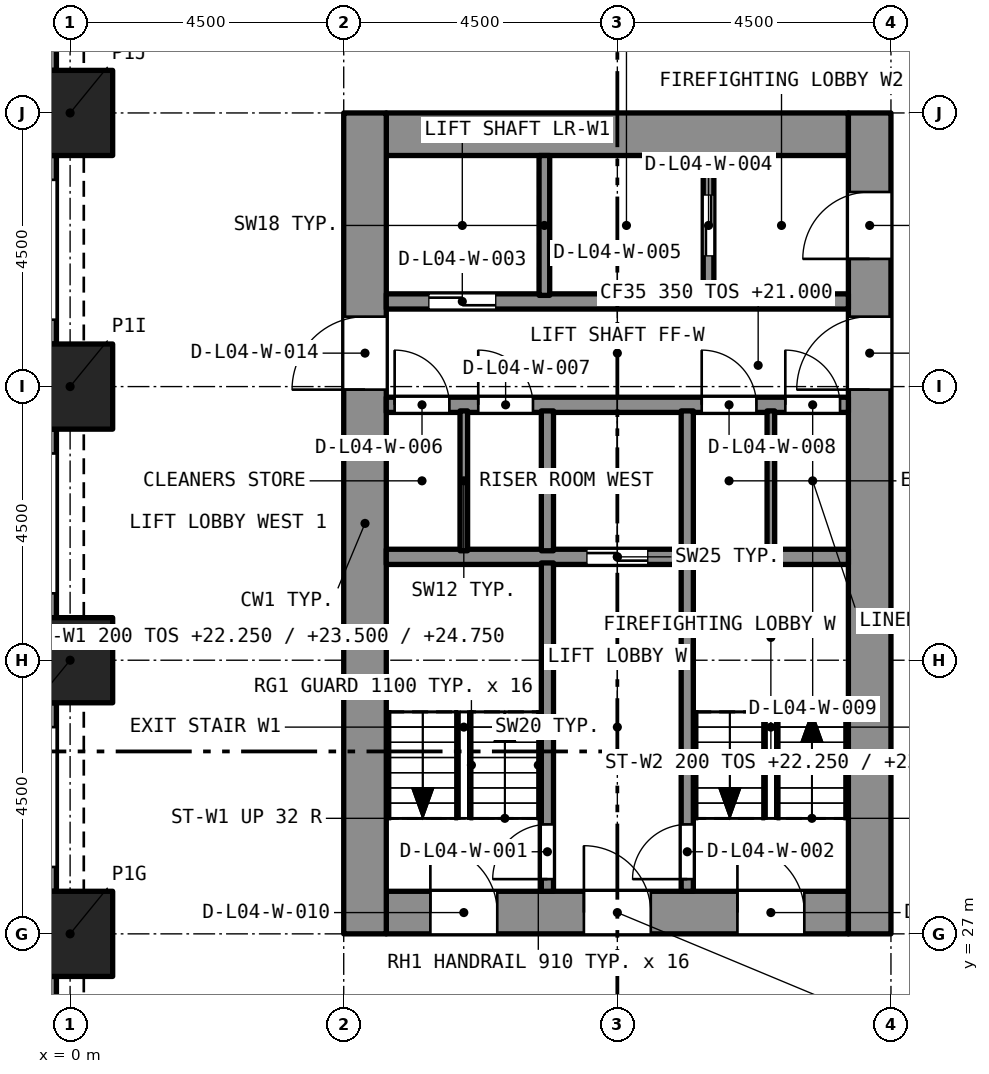
"""IFC4 building model, lengths in metres.
Left out: names, types, materials, properties, quantities, classifications, styles, units other than length and angle.
Written with IfcOpenShell. Run it as: python <this file> out.ifc"""

import sys

from ifc_helpers import new_model, si_unit, direction, frame, frame_2d, origin, origin_2d, place, context, subcontext, project, spatial, rectangle, extrude, element, fill, save


model = new_model("IFC4")
c1 = context("Model", 3, precision=1e-05, world=origin(), true_north=direction((0.0, 1.0)))
c2 = subcontext(c1, "Body", "Model", "MODEL_VIEW")
j1 = project(units=[si_unit("LENGTHUNIT", "METRE"), si_unit("PLANEANGLEUNIT", "RADIAN")], contexts=[c1])
p1 = place(None, origin())
s1 = spatial("IfcSite", under=j1, at=p1, CompositionType="ELEMENT")
p2 = place(p1, origin())
s2 = spatial("IfcBuilding", under=s1, at=p2, CompositionType="ELEMENT")
p3 = place(p2, frame((0.0, 0.0, 21.0)))
s3 = spatial("IfcBuildingStorey", under=s2, at=p3, CompositionType="ELEMENT", Elevation=21.0)
for number, where, z_axis, x_axis in (
    (1, (0.0, 27.0, 0.0), (0.0, 0.0, 1.0), (1.0, 0.0, 0.0)),
    (2, (0.0, 31.5, 0.0), (0.0, 0.0, 1.0), (1.0, 0.0, 0.0)),
    (3, (0.0, 36.0, 0.0), (0.0, 0.0, 1.0), (1.0, 0.0, 0.0)),
    (4, (0.0, 40.5, 0.0), (0.0, 0.0, 1.0), (1.0, 0.0, 0.0)),
):
    element("IfcColumn", number, at=place(p3, frame(where, z_axis=z_axis, x_axis=x_axis)), inside=s3, PredefinedType="COLUMN", context=c2, shape_type="SweptSolid", body=[
        extrude(rectangle(XDim=1.4, YDim=1.4, at=origin_2d()), origin(), (0.0, 0.0, 1.0), 5.0),
    ])
p4 = place(p3, frame((5.2, 27.35, 0.0), z_axis=(0.0, 0.0, 1.0), x_axis=(1.0, 0.0, 0.0)))
e5 = element("IfcWall", 5, at=p4, inside=s3, PredefinedType="SOLIDWALL", context=c2, shape_type="SweptSolid", body=[
    extrude(rectangle(XDim=7.6, YDim=0.7, at=frame_2d((3.8, 0.0))), origin(), (0.0, 0.0, 1.0), 5.0),
])
p5 = place(p4, frame((0.725, 0.0, 0.0)))
e6 = element("IfcOpeningElement", 6, at=p5, cuts=e5, PredefinedType="OPENING", context=c2, shape_type="SweptSolid", body=[
    extrude(rectangle(XDim=1.1, YDim=2.1, at=frame_2d((0.55, 1.05))), frame((0.0, 0.36, 0.0), z_axis=(0.0, -1.0, 0.0), x_axis=(1.0, 0.0, 0.0)), (0.0, 0.0, 1.0), 0.72),
])
p6 = place(p4, frame((3.25, 0.0, 0.0)))
e7 = element("IfcOpeningElement", 7, at=p6, cuts=e5, PredefinedType="OPENING", context=c2, shape_type="SweptSolid", body=[
    extrude(rectangle(XDim=1.1, YDim=2.1, at=frame_2d((0.55, 1.05))), frame((0.0, 0.36, 0.0), z_axis=(0.0, -1.0, 0.0), x_axis=(1.0, 0.0, 0.0)), (0.0, 0.0, 1.0), 0.72),
])
p7 = place(p4, frame((5.775, 0.0, 0.0)))
e8 = element("IfcOpeningElement", 8, at=p7, cuts=e5, PredefinedType="OPENING", context=c2, shape_type="SweptSolid", body=[
    extrude(rectangle(XDim=1.1, YDim=2.1, at=frame_2d((0.55, 1.05))), frame((0.0, 0.36, 0.0), z_axis=(0.0, -1.0, 0.0), x_axis=(1.0, 0.0, 0.0)), (0.0, 0.0, 1.0), 0.72),
])
p8 = place(p3, frame((5.2, 40.15, 0.0), z_axis=(0.0, 0.0, 1.0), x_axis=(1.0, 0.0, 0.0)))
e9 = element("IfcWall", 9, at=p8, inside=s3, PredefinedType="SOLIDWALL", context=c2, shape_type="SweptSolid", body=[
    extrude(rectangle(XDim=7.6, YDim=0.7, at=frame_2d((3.8, 0.0))), origin(), (0.0, 0.0, 1.0), 5.0),
])
p9 = place(p3, frame((4.85, 27.0, 0.0), z_axis=(0.0, 0.0, 1.0), x_axis=(0.0, 1.0, 0.0)))
e10 = element("IfcWall", 10, at=p9, inside=s3, PredefinedType="SOLIDWALL", context=c2, shape_type="SweptSolid", body=[
    extrude(rectangle(XDim=13.5, YDim=0.7, at=frame_2d((6.75, 0.0))), origin(), (0.0, 0.0, 1.0), 5.0),
])
p10 = place(p9, frame((8.95, 0.0, 0.0)))
e11 = element("IfcOpeningElement", 11, at=p10, cuts=e10, PredefinedType="OPENING", context=c2, shape_type="SweptSolid", body=[
    extrude(rectangle(XDim=1.2, YDim=2.1, at=frame_2d((0.6, 1.05))), frame((0.0, 0.36, 0.0), z_axis=(0.0, -1.0, 0.0), x_axis=(1.0, 0.0, 0.0)), (0.0, 0.0, 1.0), 0.72),
])
p11 = place(p3, frame((13.15, 27.0, 0.0), z_axis=(0.0, 0.0, 1.0), x_axis=(0.0, 1.0, 0.0)))
e12 = element("IfcWall", 12, at=p11, inside=s3, PredefinedType="SOLIDWALL", context=c2, shape_type="SweptSolid", body=[
    extrude(rectangle(XDim=13.5, YDim=0.7, at=frame_2d((6.75, 0.0))), origin(), (0.0, 0.0, 1.0), 5.0),
])
p12 = place(p11, frame((11.1, 0.0, 0.0)))
e13 = element("IfcOpeningElement", 13, at=p12, cuts=e12, PredefinedType="OPENING", context=c2, shape_type="SweptSolid", body=[
    extrude(rectangle(XDim=1.1, YDim=2.1, at=frame_2d((0.55, 1.05))), frame((0.0, 0.36, 0.0), z_axis=(0.0, -1.0, 0.0), x_axis=(1.0, 0.0, 0.0)), (0.0, 0.0, 1.0), 0.72),
])
p13 = place(p11, frame((8.95, 0.0, 0.0)))
e14 = element("IfcOpeningElement", 14, at=p13, cuts=e12, PredefinedType="OPENING", context=c2, shape_type="SweptSolid", body=[
    extrude(rectangle(XDim=1.2, YDim=2.1, at=frame_2d((0.6, 1.05))), frame((0.0, 0.36, 0.0), z_axis=(0.0, -1.0, 0.0), x_axis=(1.0, 0.0, 0.0)), (0.0, 0.0, 1.0), 0.72),
])
p14 = place(p3, frame((-0.375, 41.2, 0.0), z_axis=(0.0, 0.0, 1.0), x_axis=(0.0, 1.0, 0.0)))
e15 = element("IfcWall", 15, at=p14, inside=s3, PredefinedType="SOLIDWALL", context=c2, shape_type="SweptSolid", body=[
    extrude(rectangle(XDim=3.1, YDim=0.3, at=frame_2d((1.55, 0.0))), origin(), (0.0, 0.0, 1.0), 5.0),
])
p15 = place(p14, frame((0.4, 0.0, 0.45)))
e16 = element("IfcOpeningElement", 16, at=p15, cuts=e15, PredefinedType="OPENING", context=c2, shape_type="SweptSolid", body=[
    extrude(rectangle(XDim=2.3, YDim=3.3, at=frame_2d((1.15, 1.65))), frame((0.0, 0.16, 0.0), z_axis=(0.0, -1.0, 0.0), x_axis=(1.0, 0.0, 0.0)), (0.0, 0.0, 1.0), 0.32),
])
p16 = place(p3, frame((-0.375, 36.7, 0.0), z_axis=(0.0, 0.0, 1.0), x_axis=(0.0, 1.0, 0.0)))
e17 = element("IfcWall", 17, at=p16, inside=s3, PredefinedType="SOLIDWALL", context=c2, shape_type="SweptSolid", body=[
    extrude(rectangle(XDim=3.1, YDim=0.3, at=frame_2d((1.55, 0.0))), origin(), (0.0, 0.0, 1.0), 5.0),
])
p17 = place(p16, frame((0.4, 0.0, 0.45)))
e18 = element("IfcOpeningElement", 18, at=p17, cuts=e17, PredefinedType="OPENING", context=c2, shape_type="SweptSolid", body=[
    extrude(rectangle(XDim=2.3, YDim=3.3, at=frame_2d((1.15, 1.65))), frame((0.0, 0.16, 0.0), z_axis=(0.0, -1.0, 0.0), x_axis=(1.0, 0.0, 0.0)), (0.0, 0.0, 1.0), 0.32),
])
p18 = place(p3, frame((-0.375, 32.2, 0.0), z_axis=(0.0, 0.0, 1.0), x_axis=(0.0, 1.0, 0.0)))
e19 = element("IfcWall", 19, at=p18, inside=s3, PredefinedType="SOLIDWALL", context=c2, shape_type="SweptSolid", body=[
    extrude(rectangle(XDim=3.1, YDim=0.3, at=frame_2d((1.55, 0.0))), origin(), (0.0, 0.0, 1.0), 5.0),
])
p19 = place(p18, frame((0.4, 0.0, 0.45)))
e20 = element("IfcOpeningElement", 20, at=p19, cuts=e19, PredefinedType="OPENING", context=c2, shape_type="SweptSolid", body=[
    extrude(rectangle(XDim=2.3, YDim=3.3, at=frame_2d((1.15, 1.65))), frame((0.0, 0.16, 0.0), z_axis=(0.0, -1.0, 0.0), x_axis=(1.0, 0.0, 0.0)), (0.0, 0.0, 1.0), 0.32),
])
p20 = place(p3, frame((-0.375, 27.7, 0.0), z_axis=(0.0, 0.0, 1.0), x_axis=(0.0, 1.0, 0.0)))
e21 = element("IfcWall", 21, at=p20, inside=s3, PredefinedType="SOLIDWALL", context=c2, shape_type="SweptSolid", body=[
    extrude(rectangle(XDim=3.1, YDim=0.3, at=frame_2d((1.55, 0.0))), origin(), (0.0, 0.0, 1.0), 5.0),
])
p21 = place(p20, frame((0.4, 0.0, 0.45)))
e22 = element("IfcOpeningElement", 22, at=p21, cuts=e21, PredefinedType="OPENING", context=c2, shape_type="SweptSolid", body=[
    extrude(rectangle(XDim=2.3, YDim=3.3, at=frame_2d((1.15, 1.65))), frame((0.0, 0.16, 0.0), z_axis=(0.0, -1.0, 0.0), x_axis=(1.0, 0.0, 0.0)), (0.0, 0.0, 1.0), 0.32),
])
p22 = place(p3, frame((-0.375, 23.2, 0.0), z_axis=(0.0, 0.0, 1.0), x_axis=(0.0, 1.0, 0.0)))
e23 = element("IfcWall", 23, at=p22, inside=s3, PredefinedType="SOLIDWALL", context=c2, shape_type="SweptSolid", body=[
    extrude(rectangle(XDim=3.1, YDim=0.3, at=frame_2d((1.55, 0.0))), origin(), (0.0, 0.0, 1.0), 5.0),
])
p23 = place(p22, frame((0.4, 0.0, 0.45)))
e24 = element("IfcOpeningElement", 24, at=p23, cuts=e23, PredefinedType="OPENING", context=c2, shape_type="SweptSolid", body=[
    extrude(rectangle(XDim=2.3, YDim=3.3, at=frame_2d((1.15, 1.65))), frame((0.0, 0.16, 0.0), z_axis=(0.0, -1.0, 0.0), x_axis=(1.0, 0.0, 0.0)), (0.0, 0.0, 1.0), 0.32),
])
p24 = place(p3, frame((5.2, 33.2, 0.0), z_axis=(0.0, 0.0, 1.0), x_axis=(1.0, 0.0, 0.0)))
e25 = element("IfcWall", 25, at=p24, inside=s3, PredefinedType="SOLIDWALL", context=c2, shape_type="SweptSolid", body=[
    extrude(rectangle(XDim=7.6, YDim=0.25, at=frame_2d((3.8, 0.0))), origin(), (0.0, 0.0, 1.0), 4.65),
])
p25 = place(p24, frame((3.3, 0.0, 0.0)))
e26 = element("IfcOpeningElement", 26, at=p25, cuts=e25, PredefinedType="OPENING", context=c2, shape_type="SweptSolid", body=[
    extrude(rectangle(XDim=1.0, YDim=2.1, at=frame_2d((0.5, 1.05))), frame((0.0, 0.135, 0.0), z_axis=(0.0, -1.0, 0.0), x_axis=(1.0, 0.0, 0.0)), (0.0, 0.0, 1.0), 0.27),
])
p26 = place(p3, frame((5.2, 35.7, 0.0), z_axis=(0.0, 0.0, 1.0), x_axis=(1.0, 0.0, 0.0)))
e27 = element("IfcWall", 27, at=p26, inside=s3, PredefinedType="SOLIDWALL", context=c2, shape_type="SweptSolid", body=[
    extrude(rectangle(XDim=7.6, YDim=0.25, at=frame_2d((3.8, 0.0))), origin(), (0.0, 0.0, 1.0), 4.65),
])
p27 = place(p26, frame((0.137, 0.0, 0.0)))
e28 = element("IfcOpeningElement", 28, at=p27, cuts=e27, PredefinedType="OPENING", context=c2, shape_type="SweptSolid", body=[
    extrude(rectangle(XDim=0.9, YDim=2.1, at=frame_2d((0.45, 1.05))), frame((0.0, 0.135, 0.0), z_axis=(0.0, -1.0, 0.0), x_axis=(1.0, 0.0, 0.0)), (0.0, 0.0, 1.0), 0.27),
])
p28 = place(p26, frame((1.512, 0.0, 0.0)))
e29 = element("IfcOpeningElement", 29, at=p28, cuts=e27, PredefinedType="OPENING", context=c2, shape_type="SweptSolid", body=[
    extrude(rectangle(XDim=0.9, YDim=2.1, at=frame_2d((0.45, 1.05))), frame((0.0, 0.135, 0.0), z_axis=(0.0, -1.0, 0.0), x_axis=(1.0, 0.0, 0.0)), (0.0, 0.0, 1.0), 0.27),
])
p29 = place(p26, frame((5.188, 0.0, 0.0)))
e30 = element("IfcOpeningElement", 30, at=p29, cuts=e27, PredefinedType="OPENING", context=c2, shape_type="SweptSolid", body=[
    extrude(rectangle(XDim=0.9, YDim=2.1, at=frame_2d((0.45, 1.05))), frame((0.0, 0.135, 0.0), z_axis=(0.0, -1.0, 0.0), x_axis=(1.0, 0.0, 0.0)), (0.0, 0.0, 1.0), 0.27),
])
p30 = place(p26, frame((6.562, 0.0, 0.0)))
e31 = element("IfcOpeningElement", 31, at=p30, cuts=e27, PredefinedType="OPENING", context=c2, shape_type="SweptSolid", body=[
    extrude(rectangle(XDim=0.9, YDim=2.1, at=frame_2d((0.45, 1.05))), frame((0.0, 0.135, 0.0), z_axis=(0.0, -1.0, 0.0), x_axis=(1.0, 0.0, 0.0)), (0.0, 0.0, 1.0), 0.27),
])
p31 = place(p3, frame((5.2, 37.4, 0.0), z_axis=(0.0, 0.0, 1.0), x_axis=(1.0, 0.0, 0.0)))
e32 = element("IfcWall", 32, at=p31, inside=s3, PredefinedType="SOLIDWALL", context=c2, shape_type="SweptSolid", body=[
    extrude(rectangle(XDim=7.6, YDim=0.25, at=frame_2d((3.8, 0.0))), origin(), (0.0, 0.0, 1.0), 4.65),
])
p32 = place(p31, frame((0.7, 0.0, 0.0)))
e33 = element("IfcOpeningElement", 33, at=p32, cuts=e32, PredefinedType="OPENING", context=c2, shape_type="SweptSolid", body=[
    extrude(rectangle(XDim=1.1, YDim=2.4, at=frame_2d((0.55, 1.2))), frame((0.0, 0.135, 0.0), z_axis=(0.0, -1.0, 0.0), x_axis=(1.0, 0.0, 0.0)), (0.0, 0.0, 1.0), 0.27),
])
p33 = place(p3, frame((7.85, 27.7, 0.0), z_axis=(0.0, 0.0, 1.0), x_axis=(0.0, 1.0, 0.0)))
e34 = element("IfcWall", 34, at=p33, inside=s3, PredefinedType="SOLIDWALL", context=c2, shape_type="SweptSolid", body=[
    extrude(rectangle(XDim=5.4, YDim=0.2, at=frame_2d((2.7, 0.0))), origin(), (0.0, 0.0, 1.0), 4.65),
])
p34 = place(p33, frame((0.2, 0.0, 0.0)))
e35 = element("IfcOpeningElement", 35, at=p34, cuts=e34, PredefinedType="OPENING", context=c2, shape_type="SweptSolid", body=[
    extrude(rectangle(XDim=0.9, YDim=2.1, at=frame_2d((0.45, 1.05))), frame((0.0, 0.11, 0.0), z_axis=(0.0, -1.0, 0.0), x_axis=(1.0, 0.0, 0.0)), (0.0, 0.0, 1.0), 0.22),
])
p35 = place(p3, frame((10.15, 27.7, 0.0), z_axis=(0.0, 0.0, 1.0), x_axis=(0.0, 1.0, 0.0)))
e36 = element("IfcWall", 36, at=p35, inside=s3, PredefinedType="SOLIDWALL", context=c2, shape_type="SweptSolid", body=[
    extrude(rectangle(XDim=5.4, YDim=0.2, at=frame_2d((2.7, 0.0))), origin(), (0.0, 0.0, 1.0), 4.65),
])
p36 = place(p35, frame((0.2, 0.0, 0.0)))
e37 = element("IfcOpeningElement", 37, at=p36, cuts=e36, PredefinedType="OPENING", context=c2, shape_type="SweptSolid", body=[
    extrude(rectangle(XDim=0.9, YDim=2.1, at=frame_2d((0.45, 1.05))), frame((0.0, 0.11, 0.0), z_axis=(0.0, -1.0, 0.0), x_axis=(1.0, 0.0, 0.0)), (0.0, 0.0, 1.0), 0.22),
])
for number, where, z_axis, x_axis in (
    (38, (7.85, 33.3, 0.0), (0.0, 0.0, 1.0), (0.0, 1.0, 0.0)),
    (39, (10.15, 33.3, 0.0), (0.0, 0.0, 1.0), (0.0, 1.0, 0.0)),
):
    element("IfcWall", number, at=place(p3, frame(where, z_axis=z_axis, x_axis=x_axis)), inside=s3, PredefinedType="SOLIDWALL", context=c2, shape_type="SweptSolid", body=[
        extrude(rectangle(XDim=2.3, YDim=0.2, at=frame_2d((1.15, 0.0))), origin(), (0.0, 0.0, 1.0), 4.65),
    ])
p37 = place(p3, frame((7.8, 37.5, 0.0), z_axis=(0.0, 0.0, 1.0), x_axis=(0.0, 1.0, 0.0)))
e40 = element("IfcWall", 40, at=p37, inside=s3, PredefinedType="SOLIDWALL", context=c2, shape_type="SweptSolid", body=[
    extrude(rectangle(XDim=2.3, YDim=0.175, at=frame_2d((1.15, 0.0))), origin(), (0.0, 0.0, 1.0), 4.65),
])
p38 = place(p3, frame((10.5, 37.5, 0.0), z_axis=(0.0, 0.0, 1.0), x_axis=(0.0, 1.0, 0.0)))
e41 = element("IfcWall", 41, at=p38, inside=s3, PredefinedType="SOLIDWALL", context=c2, shape_type="SweptSolid", body=[
    extrude(rectangle(XDim=2.3, YDim=0.175, at=frame_2d((1.15, 0.0))), origin(), (0.0, 0.0, 1.0), 4.65),
])
p39 = place(p38, frame((0.65, 0.0, 0.0)))
e42 = element("IfcOpeningElement", 42, at=p39, cuts=e41, PredefinedType="OPENING", context=c2, shape_type="SweptSolid", body=[
    extrude(rectangle(XDim=1.0, YDim=2.1, at=frame_2d((0.5, 1.05))), frame((0.0, 0.097, 0.0), z_axis=(0.0, -1.0, 0.0), x_axis=(1.0, 0.0, 0.0)), (0.0, 0.0, 1.0), 0.195),
])
for number, where, z_axis, x_axis in (
    (43, (6.475, 33.3, 0.0), (0.0, 0.0, 1.0), (0.0, 1.0, 0.0)),
    (44, (11.525, 33.3, 0.0), (0.0, 0.0, 1.0), (0.0, 1.0, 0.0)),
):
    element("IfcWall", number, at=place(p3, frame(where, z_axis=z_axis, x_axis=x_axis)), inside=s3, PredefinedType="PARTITIONING", context=c2, shape_type="SweptSolid", body=[
        extrude(rectangle(XDim=2.3, YDim=0.125, at=frame_2d((1.15, 0.0))), origin(), (0.0, 0.0, 1.0), 4.65),
    ])
p40 = place(p34, origin())
e45 = element("IfcDoor", 45, at=p40, inside=s3, OperationType="SINGLE_SWING_LEFT", PredefinedType="DOOR", context=c2, shape_type="SweptSolid", body=[
    extrude(rectangle(XDim=0.9, YDim=2.1, at=frame_2d((0.45, 1.05))), frame((0.0, 0.025, 0.0), z_axis=(0.0, -1.0, 0.0), x_axis=(1.0, 0.0, 0.0)), (0.0, 0.0, 1.0), 0.05),
])
fill(e35, e45)
p41 = place(p36, origin())
e46 = element("IfcDoor", 46, at=p41, inside=s3, OperationType="SINGLE_SWING_LEFT", PredefinedType="DOOR", context=c2, shape_type="SweptSolid", body=[
    extrude(rectangle(XDim=0.9, YDim=2.1, at=frame_2d((0.45, 1.05))), frame((0.0, 0.025, 0.0), z_axis=(0.0, -1.0, 0.0), x_axis=(1.0, 0.0, 0.0)), (0.0, 0.0, 1.0), 0.05),
])
fill(e37, e46)
p42 = place(p32, origin())
e47 = element("IfcDoor", 47, at=p42, inside=s3, OperationType="SLIDING_TO_LEFT", PredefinedType="DOOR", context=c2, shape_type="SweptSolid", body=[
    extrude(rectangle(XDim=1.1, YDim=2.4, at=frame_2d((0.55, 1.2))), frame((0.0, 0.025, 0.0), z_axis=(0.0, -1.0, 0.0), x_axis=(1.0, 0.0, 0.0)), (0.0, 0.0, 1.0), 0.05),
])
fill(e33, e47)
p43 = place(p39, origin())
e48 = element("IfcDoor", 48, at=p43, inside=s3, OperationType="SLIDING_TO_LEFT", PredefinedType="DOOR", context=c2, shape_type="SweptSolid", body=[
    extrude(rectangle(XDim=1.0, YDim=2.1, at=frame_2d((0.5, 1.05))), frame((0.0, 0.025, 0.0), z_axis=(0.0, -1.0, 0.0), x_axis=(1.0, 0.0, 0.0)), (0.0, 0.0, 1.0), 0.05),
])
fill(e42, e48)
p44 = place(p25, origin())
e49 = element("IfcDoor", 49, at=p44, inside=s3, OperationType="SLIDING_TO_LEFT", PredefinedType="DOOR", context=c2, shape_type="SweptSolid", body=[
    extrude(rectangle(XDim=1.0, YDim=2.1, at=frame_2d((0.5, 1.05))), frame((0.0, 0.025, 0.0), z_axis=(0.0, -1.0, 0.0), x_axis=(1.0, 0.0, 0.0)), (0.0, 0.0, 1.0), 0.05),
])
fill(e26, e49)
p45 = place(p27, origin())
e50 = element("IfcDoor", 50, at=p45, inside=s3, OperationType="SINGLE_SWING_LEFT", PredefinedType="DOOR", context=c2, shape_type="SweptSolid", body=[
    extrude(rectangle(XDim=0.9, YDim=2.1, at=frame_2d((0.45, 1.05))), frame((0.0, 0.025, 0.0), z_axis=(0.0, -1.0, 0.0), x_axis=(1.0, 0.0, 0.0)), (0.0, 0.0, 1.0), 0.05),
])
fill(e28, e50)
p46 = place(p28, origin())
e51 = element("IfcDoor", 51, at=p46, inside=s3, OperationType="SINGLE_SWING_LEFT", PredefinedType="DOOR", context=c2, shape_type="SweptSolid", body=[
    extrude(rectangle(XDim=0.9, YDim=2.1, at=frame_2d((0.45, 1.05))), frame((0.0, 0.025, 0.0), z_axis=(0.0, -1.0, 0.0), x_axis=(1.0, 0.0, 0.0)), (0.0, 0.0, 1.0), 0.05),
])
fill(e29, e51)
p47 = place(p29, origin())
e52 = element("IfcDoor", 52, at=p47, inside=s3, OperationType="SINGLE_SWING_LEFT", PredefinedType="DOOR", context=c2, shape_type="SweptSolid", body=[
    extrude(rectangle(XDim=0.9, YDim=2.1, at=frame_2d((0.45, 1.05))), frame((0.0, 0.025, 0.0), z_axis=(0.0, -1.0, 0.0), x_axis=(1.0, 0.0, 0.0)), (0.0, 0.0, 1.0), 0.05),
])
fill(e30, e52)
p48 = place(p30, origin())
e53 = element("IfcDoor", 53, at=p48, inside=s3, OperationType="SINGLE_SWING_LEFT", PredefinedType="DOOR", context=c2, shape_type="SweptSolid", body=[
    extrude(rectangle(XDim=0.9, YDim=2.1, at=frame_2d((0.45, 1.05))), frame((0.0, 0.025, 0.0), z_axis=(0.0, -1.0, 0.0), x_axis=(1.0, 0.0, 0.0)), (0.0, 0.0, 1.0), 0.05),
])
fill(e31, e53)
p49 = place(p5, origin())
e54 = element("IfcDoor", 54, at=p49, inside=s3, OperationType="SINGLE_SWING_LEFT", PredefinedType="DOOR", context=c2, shape_type="SweptSolid", body=[
    extrude(rectangle(XDim=1.1, YDim=2.1, at=frame_2d((0.55, 1.05))), frame((0.0, 0.025, 0.0), z_axis=(0.0, -1.0, 0.0), x_axis=(1.0, 0.0, 0.0)), (0.0, 0.0, 1.0), 0.05),
])
fill(e6, e54)
p50 = place(p6, origin())
e55 = element("IfcDoor", 55, at=p50, inside=s3, OperationType="SINGLE_SWING_LEFT", PredefinedType="DOOR", context=c2, shape_type="SweptSolid", body=[
    extrude(rectangle(XDim=1.1, YDim=2.1, at=frame_2d((0.55, 1.05))), frame((0.0, 0.025, 0.0), z_axis=(0.0, -1.0, 0.0), x_axis=(1.0, 0.0, 0.0)), (0.0, 0.0, 1.0), 0.05),
])
fill(e7, e55)
p51 = place(p7, origin())
e56 = element("IfcDoor", 56, at=p51, inside=s3, OperationType="SINGLE_SWING_LEFT", PredefinedType="DOOR", context=c2, shape_type="SweptSolid", body=[
    extrude(rectangle(XDim=1.1, YDim=2.1, at=frame_2d((0.55, 1.05))), frame((0.0, 0.025, 0.0), z_axis=(0.0, -1.0, 0.0), x_axis=(1.0, 0.0, 0.0)), (0.0, 0.0, 1.0), 0.05),
])
fill(e8, e56)
p52 = place(p12, origin())
e57 = element("IfcDoor", 57, at=p52, inside=s3, OperationType="SINGLE_SWING_LEFT", PredefinedType="DOOR", context=c2, shape_type="SweptSolid", body=[
    extrude(rectangle(XDim=1.1, YDim=2.1, at=frame_2d((0.55, 1.05))), frame((0.0, 0.025, 0.0), z_axis=(0.0, -1.0, 0.0), x_axis=(1.0, 0.0, 0.0)), (0.0, 0.0, 1.0), 0.05),
])
fill(e13, e57)
p53 = place(p10, origin())
e58 = element("IfcDoor", 58, at=p53, inside=s3, OperationType="SINGLE_SWING_LEFT", PredefinedType="DOOR", context=c2, shape_type="SweptSolid", body=[
    extrude(rectangle(XDim=1.2, YDim=2.1, at=frame_2d((0.6, 1.05))), frame((0.0, 0.025, 0.0), z_axis=(0.0, -1.0, 0.0), x_axis=(1.0, 0.0, 0.0)), (0.0, 0.0, 1.0), 0.05),
])
fill(e11, e58)
p54 = place(p13, origin())
e59 = element("IfcDoor", 59, at=p54, inside=s3, OperationType="SINGLE_SWING_LEFT", PredefinedType="DOOR", context=c2, shape_type="SweptSolid", body=[
    extrude(rectangle(XDim=1.2, YDim=2.1, at=frame_2d((0.6, 1.05))), frame((0.0, 0.025, 0.0), z_axis=(0.0, -1.0, 0.0), x_axis=(1.0, 0.0, 0.0)), (0.0, 0.0, 1.0), 0.05),
])
fill(e14, e59)
save(model, sys.argv[1])
